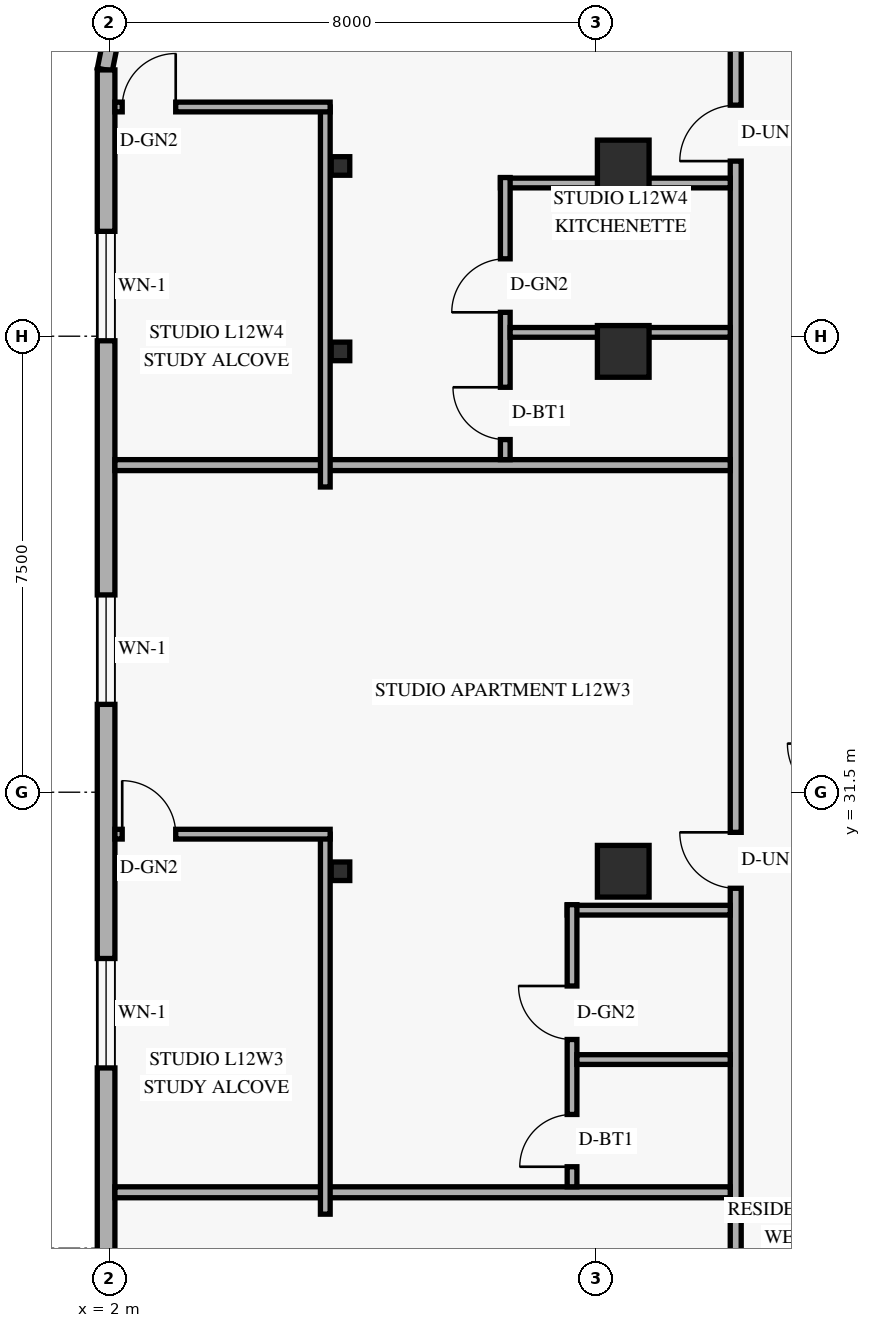
"""IFC4 building model, lengths in metres.
Left out: names, types, materials, properties, quantities, classifications, styles, units other than length and angle.
Written with IfcOpenShell. Run it as: python <this file> out.ifc"""

import sys

from ifc_helpers import new_model, si_unit, direction, frame, frame_2d, origin, origin_2d, place, context, subcontext, project, spatial, rectangle, hollow_rectangle, extrude, element, fill, save


model = new_model("IFC4")
c1 = context("Model", 3, precision=1e-05, world=origin(), true_north=direction((0.0, 1.0)))
c2 = subcontext(c1, "Body", "Model", "MODEL_VIEW")
j1 = project(units=[si_unit("LENGTHUNIT", "METRE"), si_unit("PLANEANGLEUNIT", "RADIAN")], contexts=[c1])
p1 = place(None, origin())
s1 = spatial("IfcSite", under=j1, at=p1, CompositionType="ELEMENT")
p2 = place(p1, origin())
s2 = spatial("IfcBuilding", under=s1, at=p2, CompositionType="ELEMENT")
p3 = place(p2, frame((0.0, 0.0, 49.2)))
s3 = spatial("IfcBuildingStorey", under=s2, at=p3, CompositionType="ELEMENT", Elevation=49.2)
for number, where, z_axis, x_axis in (
    (1, (5.8, 30.2, 0.0), (0.0, 0.0, 1.0), (1.0, 0.0, 0.0)),
    (2, (5.8, 38.75, 0.0), (0.0, 0.0, 1.0), (1.0, 0.0, 0.0)),
    (3, (5.8, 41.8, 0.0), (0.0, 0.0, 1.0), (1.0, 0.0, 0.0)),
):
    element("IfcColumn", number, at=place(p3, frame(where, z_axis=z_axis, x_axis=x_axis)), inside=s3, PredefinedType="COLUMN", context=c2, shape_type="SweptSolid", body=[
        extrude(hollow_rectangle(XDim=0.305, YDim=0.305, WallThickness=0.013, at=origin_2d()), origin(), (0.0, 0.0, 1.0), 3.6),
    ])
for number, where, z_axis, x_axis in (
    (4, (10.45, 30.2, 0.0), (0.0, 0.0, 1.0), (1.0, 0.0, 0.0)),
    (5, (10.45, 38.75, 0.0), (0.0, 0.0, 1.0), (1.0, 0.0, 0.0)),
    (6, (10.45, 41.8, 0.0), (0.0, 0.0, 1.0), (1.0, 0.0, 0.0)),
):
    element("IfcColumn", number, at=place(p3, frame(where, z_axis=z_axis, x_axis=x_axis)), inside=s3, PredefinedType="COLUMN", context=c2, shape_type="SweptSolid", body=[
        extrude(rectangle(XDim=0.85, YDim=0.85, at=origin_2d()), origin(), (0.0, 0.0, 1.0), 3.6),
    ])
p4 = place(p3, frame((2.195, 44.746, 0.0), z_axis=(0.0, 0.0, 1.0), x_axis=(-0.19496651342, -0.980809899341, 0.0)))
e7 = element("IfcWall", 7, at=p4, inside=s3, PredefinedType="SOLIDWALL", context=c2, shape_type="SweptSolid", body=[
    extrude(rectangle(XDim=1.389, YDim=0.25, at=frame_2d((0.694, 0.0))), origin(), (0.0, 0.0, 1.0), 3.36),
])
p5 = place(p3, frame((1.945, 43.38, 0.0), z_axis=(0.0, 0.0, 1.0), x_axis=(0.0, -1.0, 0.0)))
e8 = element("IfcWall", 8, at=p5, inside=s3, PredefinedType="SOLIDWALL", context=c2, shape_type="SweptSolid", body=[
    extrude(rectangle(XDim=38.76, YDim=0.29, at=frame_2d((19.38, 0.0))), origin(), (0.0, 0.0, 1.0), 3.36),
])
p6 = place(p5, frame((33.92, 0.0, 0.85)))
e9 = element("IfcOpeningElement", 9, at=p6, cuts=e8, PredefinedType="OPENING", context=c2, shape_type="SweptSolid", body=[
    extrude(rectangle(XDim=1.8, YDim=1.6, at=frame_2d((0.9, 0.8))), frame((0.0, 0.155, 0.0), z_axis=(0.0, -1.0, 0.0), x_axis=(1.0, 0.0, 0.0)), (0.0, 0.0, 1.0), 0.31),
])
p7 = place(p5, frame((27.035, 0.0, 0.85)))
e10 = element("IfcOpeningElement", 10, at=p7, cuts=e8, PredefinedType="OPENING", context=c2, shape_type="SweptSolid", body=[
    extrude(rectangle(XDim=1.8, YDim=1.6, at=frame_2d((0.9, 0.8))), frame((0.0, 0.155, 0.0), z_axis=(0.0, -1.0, 0.0), x_axis=(1.0, 0.0, 0.0)), (0.0, 0.0, 1.0), 0.31),
])
p8 = place(p5, frame((20.825, 0.0, 0.85)))
e11 = element("IfcOpeningElement", 11, at=p8, cuts=e8, PredefinedType="OPENING", context=c2, shape_type="SweptSolid", body=[
    extrude(rectangle(XDim=1.8, YDim=1.6, at=frame_2d((0.9, 0.8))), frame((0.0, 0.155, 0.0), z_axis=(0.0, -1.0, 0.0), x_axis=(1.0, 0.0, 0.0)), (0.0, 0.0, 1.0), 0.31),
])
p9 = place(p5, frame((14.615, 0.0, 0.85)))
e12 = element("IfcOpeningElement", 12, at=p9, cuts=e8, PredefinedType="OPENING", context=c2, shape_type="SweptSolid", body=[
    extrude(rectangle(XDim=1.8, YDim=1.6, at=frame_2d((0.9, 0.8))), frame((0.0, 0.155, 0.0), z_axis=(0.0, -1.0, 0.0), x_axis=(1.0, 0.0, 0.0)), (0.0, 0.0, 1.0), 0.31),
])
p10 = place(p5, frame((8.635, 0.0, 0.85)))
e13 = element("IfcOpeningElement", 13, at=p10, cuts=e8, PredefinedType="OPENING", context=c2, shape_type="SweptSolid", body=[
    extrude(rectangle(XDim=1.8, YDim=1.6, at=frame_2d((0.9, 0.8))), frame((0.0, 0.155, 0.0), z_axis=(0.0, -1.0, 0.0), x_axis=(1.0, 0.0, 0.0)), (0.0, 0.0, 1.0), 0.31),
])
p11 = place(p5, frame((2.655, 0.0, 0.85)))
e14 = element("IfcOpeningElement", 14, at=p11, cuts=e8, PredefinedType="OPENING", context=c2, shape_type="SweptSolid", body=[
    extrude(rectangle(XDim=1.8, YDim=1.6, at=frame_2d((0.9, 0.8))), frame((0.0, 0.155, 0.0), z_axis=(0.0, -1.0, 0.0), x_axis=(1.0, 0.0, 0.0)), (0.0, 0.0, 1.0), 0.31),
])
p12 = place(p3, frame((12.3, 1.29, 0.0), z_axis=(0.0, 0.0, 1.0), x_axis=(0.0, 1.0, 0.0)))
e15 = element("IfcWall", 15, at=p12, inside=s3, PredefinedType="STANDARD", context=c2, shape_type="SweptSolid", body=[
    extrude(rectangle(XDim=45.42, YDim=0.18, at=frame_2d((22.71, 0.0))), origin(), (0.0, 0.0, 1.0), 2.649),
])
p13 = place(p12, frame((5.27, 0.0, 0.0)))
e16 = element("IfcOpeningElement", 16, at=p13, cuts=e15, PredefinedType="OPENING", context=c2, shape_type="SweptSolid", body=[
    extrude(rectangle(XDim=0.92, YDim=2.15, at=frame_2d((0.46, 1.075))), frame((0.0, 0.1, 0.0), z_axis=(0.0, -1.0, 0.0), x_axis=(1.0, 0.0, 0.0)), (0.0, 0.0, 1.0), 0.2),
])
p14 = place(p12, frame((16.21, 0.0, 0.0)))
e17 = element("IfcOpeningElement", 17, at=p14, cuts=e15, PredefinedType="OPENING", context=c2, shape_type="SweptSolid", body=[
    extrude(rectangle(XDim=0.92, YDim=2.15, at=frame_2d((0.46, 1.075))), frame((0.0, 0.1, 0.0), z_axis=(0.0, -1.0, 0.0), x_axis=(1.0, 0.0, 0.0)), (0.0, 0.0, 1.0), 0.2),
])
p15 = place(p12, frame((28.63, 0.0, 0.0)))
e18 = element("IfcOpeningElement", 18, at=p15, cuts=e15, PredefinedType="OPENING", context=c2, shape_type="SweptSolid", body=[
    extrude(rectangle(XDim=0.92, YDim=2.15, at=frame_2d((0.46, 1.075))), frame((0.0, 0.1, 0.0), z_axis=(0.0, -1.0, 0.0), x_axis=(1.0, 0.0, 0.0)), (0.0, 0.0, 1.0), 0.2),
])
p16 = place(p12, frame((40.59, 0.0, 0.0)))
e19 = element("IfcOpeningElement", 19, at=p16, cuts=e15, PredefinedType="OPENING", context=c2, shape_type="SweptSolid", body=[
    extrude(rectangle(XDim=0.92, YDim=2.15, at=frame_2d((0.46, 1.075))), frame((0.0, 0.1, 0.0), z_axis=(0.0, -1.0, 0.0), x_axis=(1.0, 0.0, 0.0)), (0.0, 0.0, 1.0), 0.2),
])
p17 = place(p3, frame((2.09, 24.92, 0.0), z_axis=(0.0, 0.0, 1.0), x_axis=(1.0, 0.0, 0.0)))
e20 = element("IfcWall", 20, at=p17, inside=s3, PredefinedType="PARTITIONING", context=c2, shape_type="SweptSolid", body=[
    extrude(rectangle(XDim=10.12, YDim=0.18, at=frame_2d((5.06, 0.0))), origin(), (0.0, 0.0, 1.0), 2.649),
])
p18 = place(p3, frame((9.528, 29.56, 0.0), z_axis=(0.0, 0.0, 1.0), x_axis=(1.0, 0.0, 0.0)))
e21 = element("IfcWall", 21, at=p18, inside=s3, PredefinedType="PLUMBINGWALL", context=c2, shape_type="SweptSolid", body=[
    extrude(rectangle(XDim=2.682, YDim=0.16, at=frame_2d((1.341, 0.0))), origin(), (0.0, 0.0, 1.0), 2.649),
])
p19 = place(p3, frame((9.608, 25.01, 0.0), z_axis=(0.0, 0.0, 1.0), x_axis=(0.0, 1.0, 0.0)))
e22 = element("IfcWall", 22, at=p19, inside=s3, PredefinedType="PLUMBINGWALL", context=c2, shape_type="SweptSolid", body=[
    extrude(rectangle(XDim=4.64, YDim=0.16, at=frame_2d((2.32, 0.0))), origin(), (0.0, 0.0, 1.0), 3.36),
])
p20 = place(p19, frame((0.33, 0.0, 0.0)))
e23 = element("IfcOpeningElement", 23, at=p20, cuts=e22, PredefinedType="OPENING", context=c2, shape_type="SweptSolid", body=[
    extrude(rectangle(XDim=0.86, YDim=2.12, at=frame_2d((0.43, 1.06))), frame((0.0, 0.09, 0.0), z_axis=(0.0, -1.0, 0.0), x_axis=(1.0, 0.0, 0.0)), (0.0, 0.0, 1.0), 0.18),
])
p21 = place(p19, frame((2.423, 0.0, 0.0)))
e24 = element("IfcOpeningElement", 24, at=p21, cuts=e22, PredefinedType="OPENING", context=c2, shape_type="SweptSolid", body=[
    extrude(rectangle(XDim=0.88, YDim=2.12, at=frame_2d((0.44, 1.06))), frame((0.0, 0.09, 0.0), z_axis=(0.0, -1.0, 0.0), x_axis=(1.0, 0.0, 0.0)), (0.0, 0.0, 1.0), 0.18),
])
p22 = place(p3, frame((9.688, 27.103, 0.0), z_axis=(0.0, 0.0, 1.0), x_axis=(1.0, 0.0, 0.0)))
e25 = element("IfcWall", 25, at=p22, inside=s3, PredefinedType="PLUMBINGWALL", context=c2, shape_type="SweptSolid", body=[
    extrude(rectangle(XDim=2.522, YDim=0.16, at=frame_2d((1.261, 0.0))), origin(), (0.0, 0.0, 1.0), 2.649),
])
p23 = place(p3, frame((5.55, 24.56, 0.0), z_axis=(0.0, 0.0, 1.0), x_axis=(0.0, 1.0, 0.0)))
e26 = element("IfcWall", 26, at=p23, inside=s3, PredefinedType="PARTITIONING", context=c2, shape_type="SweptSolid", body=[
    extrude(rectangle(XDim=6.25, YDim=0.16, at=frame_2d((3.125, 0.0))), origin(), (0.0, 0.0, 1.0), 3.36),
])
p24 = place(p3, frame((2.09, 30.81, 0.0), z_axis=(0.0, 0.0, 1.0), x_axis=(1.0, 0.0, 0.0)))
e27 = element("IfcWall", 27, at=p24, inside=s3, PredefinedType="PARTITIONING", context=c2, shape_type="SweptSolid", body=[
    extrude(rectangle(XDim=3.54, YDim=0.16, at=frame_2d((1.77, 0.0))), origin(), (0.0, 0.0, 1.0), 3.36),
])
p25 = place(p24, frame((0.12, 0.0, 0.0)))
e28 = element("IfcOpeningElement", 28, at=p25, cuts=e27, PredefinedType="OPENING", context=c2, shape_type="SweptSolid", body=[
    extrude(rectangle(XDim=0.88, YDim=2.12, at=frame_2d((0.44, 1.06))), frame((0.0, 0.09, 0.0), z_axis=(0.0, -1.0, 0.0), x_axis=(1.0, 0.0, 0.0)), (0.0, 0.0, 1.0), 0.18),
])
p26 = place(p3, frame((2.09, 36.88, 0.0), z_axis=(0.0, 0.0, 1.0), x_axis=(1.0, 0.0, 0.0)))
e29 = element("IfcWall", 29, at=p26, inside=s3, PredefinedType="PARTITIONING", context=c2, shape_type="SweptSolid", body=[
    extrude(rectangle(XDim=10.12, YDim=0.18, at=frame_2d((5.06, 0.0))), origin(), (0.0, 0.0, 1.0), 2.649),
])
p27 = place(p3, frame((8.43, 41.52, 0.0), z_axis=(0.0, 0.0, 1.0), x_axis=(1.0, 0.0, 0.0)))
e30 = element("IfcWall", 30, at=p27, inside=s3, PredefinedType="PLUMBINGWALL", context=c2, shape_type="SweptSolid", body=[
    extrude(rectangle(XDim=3.78, YDim=0.16, at=frame_2d((1.89, 0.0))), origin(), (0.0, 0.0, 1.0), 3.36),
])
p28 = place(p3, frame((8.51, 36.97, 0.0), z_axis=(0.0, 0.0, 1.0), x_axis=(0.0, 1.0, 0.0)))
e31 = element("IfcWall", 31, at=p28, inside=s3, PredefinedType="PLUMBINGWALL", context=c2, shape_type="SweptSolid", body=[
    extrude(rectangle(XDim=4.64, YDim=0.16, at=frame_2d((2.32, 0.0))), origin(), (0.0, 0.0, 1.0), 2.649),
])
p29 = place(p28, frame((0.33, 0.0, 0.0)))
e32 = element("IfcOpeningElement", 32, at=p29, cuts=e31, PredefinedType="OPENING", context=c2, shape_type="SweptSolid", body=[
    extrude(rectangle(XDim=0.86, YDim=2.12, at=frame_2d((0.43, 1.06))), frame((0.0, 0.09, 0.0), z_axis=(0.0, -1.0, 0.0), x_axis=(1.0, 0.0, 0.0)), (0.0, 0.0, 1.0), 0.18),
])
p30 = place(p28, frame((2.423, 0.0, 0.0)))
e33 = element("IfcOpeningElement", 33, at=p30, cuts=e31, PredefinedType="OPENING", context=c2, shape_type="SweptSolid", body=[
    extrude(rectangle(XDim=0.88, YDim=2.12, at=frame_2d((0.44, 1.06))), frame((0.0, 0.09, 0.0), z_axis=(0.0, -1.0, 0.0), x_axis=(1.0, 0.0, 0.0)), (0.0, 0.0, 1.0), 0.18),
])
p31 = place(p3, frame((8.59, 39.063, 0.0), z_axis=(0.0, 0.0, 1.0), x_axis=(1.0, 0.0, 0.0)))
e34 = element("IfcWall", 34, at=p31, inside=s3, PredefinedType="PLUMBINGWALL", context=c2, shape_type="SweptSolid", body=[
    extrude(rectangle(XDim=3.62, YDim=0.16, at=frame_2d((1.81, 0.0))), origin(), (0.0, 0.0, 1.0), 3.36),
])
p32 = place(p3, frame((5.55, 36.52, 0.0), z_axis=(0.0, 0.0, 1.0), x_axis=(0.0, 1.0, 0.0)))
e35 = element("IfcWall", 35, at=p32, inside=s3, PredefinedType="PARTITIONING", context=c2, shape_type="SweptSolid", body=[
    extrude(rectangle(XDim=6.25, YDim=0.16, at=frame_2d((3.125, 0.0))), origin(), (0.0, 0.0, 1.0), 3.36),
])
p33 = place(p3, frame((2.09, 42.77, 0.0), z_axis=(0.0, 0.0, 1.0), x_axis=(1.0, 0.0, 0.0)))
e36 = element("IfcWall", 36, at=p33, inside=s3, PredefinedType="PARTITIONING", context=c2, shape_type="SweptSolid", body=[
    extrude(rectangle(XDim=3.54, YDim=0.16, at=frame_2d((1.77, 0.0))), origin(), (0.0, 0.0, 1.0), 3.36),
])
p34 = place(p33, frame((0.12, 0.0, 0.0)))
e37 = element("IfcOpeningElement", 37, at=p34, cuts=e36, PredefinedType="OPENING", context=c2, shape_type="SweptSolid", body=[
    extrude(rectangle(XDim=0.88, YDim=2.12, at=frame_2d((0.44, 1.06))), frame((0.0, 0.09, 0.0), z_axis=(0.0, -1.0, 0.0), x_axis=(1.0, 0.0, 0.0)), (0.0, 0.0, 1.0), 0.18),
])
p35 = place(p9, origin())
e38 = element("IfcWindow", 38, at=p35, inside=s3, PartitioningType="SINGLE_PANEL", PredefinedType="WINDOW", context=c2, shape_type="SweptSolid", body=[
    extrude(rectangle(XDim=1.8, YDim=1.6, at=frame_2d((0.9, 0.8))), frame((0.0, 0.03, 0.0), z_axis=(0.0, -1.0, 0.0), x_axis=(1.0, 0.0, 0.0)), (0.0, 0.0, 1.0), 0.06),
])
fill(e12, e38)
p36 = place(p10, origin())
e39 = element("IfcWindow", 39, at=p36, inside=s3, PartitioningType="SINGLE_PANEL", PredefinedType="WINDOW", context=c2, shape_type="SweptSolid", body=[
    extrude(rectangle(XDim=1.8, YDim=1.6, at=frame_2d((0.9, 0.8))), frame((0.0, 0.03, 0.0), z_axis=(0.0, -1.0, 0.0), x_axis=(1.0, 0.0, 0.0)), (0.0, 0.0, 1.0), 0.06),
])
fill(e13, e39)
p37 = place(p11, origin())
e40 = element("IfcWindow", 40, at=p37, inside=s3, PartitioningType="SINGLE_PANEL", PredefinedType="WINDOW", context=c2, shape_type="SweptSolid", body=[
    extrude(rectangle(XDim=1.8, YDim=1.6, at=frame_2d((0.9, 0.8))), frame((0.0, 0.03, 0.0), z_axis=(0.0, -1.0, 0.0), x_axis=(1.0, 0.0, 0.0)), (0.0, 0.0, 1.0), 0.06),
])
fill(e14, e40)
p38 = place(p25, origin())
e41 = element("IfcDoor", 41, at=p38, inside=s3, OperationType="SINGLE_SWING_LEFT", PredefinedType="DOOR", context=c2, shape_type="SweptSolid", body=[
    extrude(rectangle(XDim=0.88, YDim=2.12, at=frame_2d((0.44, 1.06))), frame((0.0, 0.025, 0.0), z_axis=(0.0, -1.0, 0.0), x_axis=(1.0, 0.0, 0.0)), (0.0, 0.0, 1.0), 0.05),
])
fill(e28, e41)
p39 = place(p15, origin())
e42 = element("IfcDoor", 42, at=p39, inside=s3, OperationType="SINGLE_SWING_RIGHT", PredefinedType="DOOR", context=c2, shape_type="SweptSolid", body=[
    extrude(rectangle(XDim=0.92, YDim=2.15, at=frame_2d((0.46, 1.075))), frame((0.0, 0.025, 0.0), z_axis=(0.0, -1.0, 0.0), x_axis=(1.0, 0.0, 0.0)), (0.0, 0.0, 1.0), 0.05),
])
fill(e18, e42)
p40 = place(p20, origin())
e43 = element("IfcDoor", 43, at=p40, inside=s3, OperationType="SINGLE_SWING_LEFT", PredefinedType="DOOR", context=c2, shape_type="SweptSolid", body=[
    extrude(rectangle(XDim=0.86, YDim=2.12, at=frame_2d((0.43, 1.06))), frame((0.0, 0.025, 0.0), z_axis=(0.0, -1.0, 0.0), x_axis=(1.0, 0.0, 0.0)), (0.0, 0.0, 1.0), 0.05),
])
fill(e23, e43)
p41 = place(p21, origin())
e44 = element("IfcDoor", 44, at=p41, inside=s3, OperationType="SINGLE_SWING_RIGHT", PredefinedType="DOOR", context=c2, shape_type="SweptSolid", body=[
    extrude(rectangle(XDim=0.88, YDim=2.12, at=frame_2d((0.44, 1.06))), frame((0.0, 0.025, 0.0), z_axis=(0.0, -1.0, 0.0), x_axis=(1.0, 0.0, 0.0)), (0.0, 0.0, 1.0), 0.05),
])
fill(e24, e44)
p42 = place(p34, origin())
e45 = element("IfcDoor", 45, at=p42, inside=s3, OperationType="SINGLE_SWING_RIGHT", PredefinedType="DOOR", context=c2, shape_type="SweptSolid", body=[
    extrude(rectangle(XDim=0.88, YDim=2.12, at=frame_2d((0.44, 1.06))), frame((0.0, 0.025, 0.0), z_axis=(0.0, -1.0, 0.0), x_axis=(1.0, 0.0, 0.0)), (0.0, 0.0, 1.0), 0.05),
])
fill(e37, e45)
p43 = place(p16, origin())
e46 = element("IfcDoor", 46, at=p43, inside=s3, OperationType="SINGLE_SWING_LEFT", PredefinedType="DOOR", context=c2, shape_type="SweptSolid", body=[
    extrude(rectangle(XDim=0.92, YDim=2.15, at=frame_2d((0.46, 1.075))), frame((0.0, 0.025, 0.0), z_axis=(0.0, -1.0, 0.0), x_axis=(1.0, 0.0, 0.0)), (0.0, 0.0, 1.0), 0.05),
])
fill(e19, e46)
p44 = place(p29, origin())
e47 = element("IfcDoor", 47, at=p44, inside=s3, OperationType="SINGLE_SWING_RIGHT", PredefinedType="DOOR", context=c2, shape_type="SweptSolid", body=[
    extrude(rectangle(XDim=0.86, YDim=2.12, at=frame_2d((0.43, 1.06))), frame((0.0, 0.025, 0.0), z_axis=(0.0, -1.0, 0.0), x_axis=(1.0, 0.0, 0.0)), (0.0, 0.0, 1.0), 0.05),
])
fill(e32, e47)
p45 = place(p30, origin())
e48 = element("IfcDoor", 48, at=p45, inside=s3, OperationType="SINGLE_SWING_LEFT", PredefinedType="DOOR", context=c2, shape_type="SweptSolid", body=[
    extrude(rectangle(XDim=0.88, YDim=2.12, at=frame_2d((0.44, 1.06))), frame((0.0, 0.025, 0.0), z_axis=(0.0, -1.0, 0.0), x_axis=(1.0, 0.0, 0.0)), (0.0, 0.0, 1.0), 0.05),
])
fill(e33, e48)
save(model, sys.argv[1])
